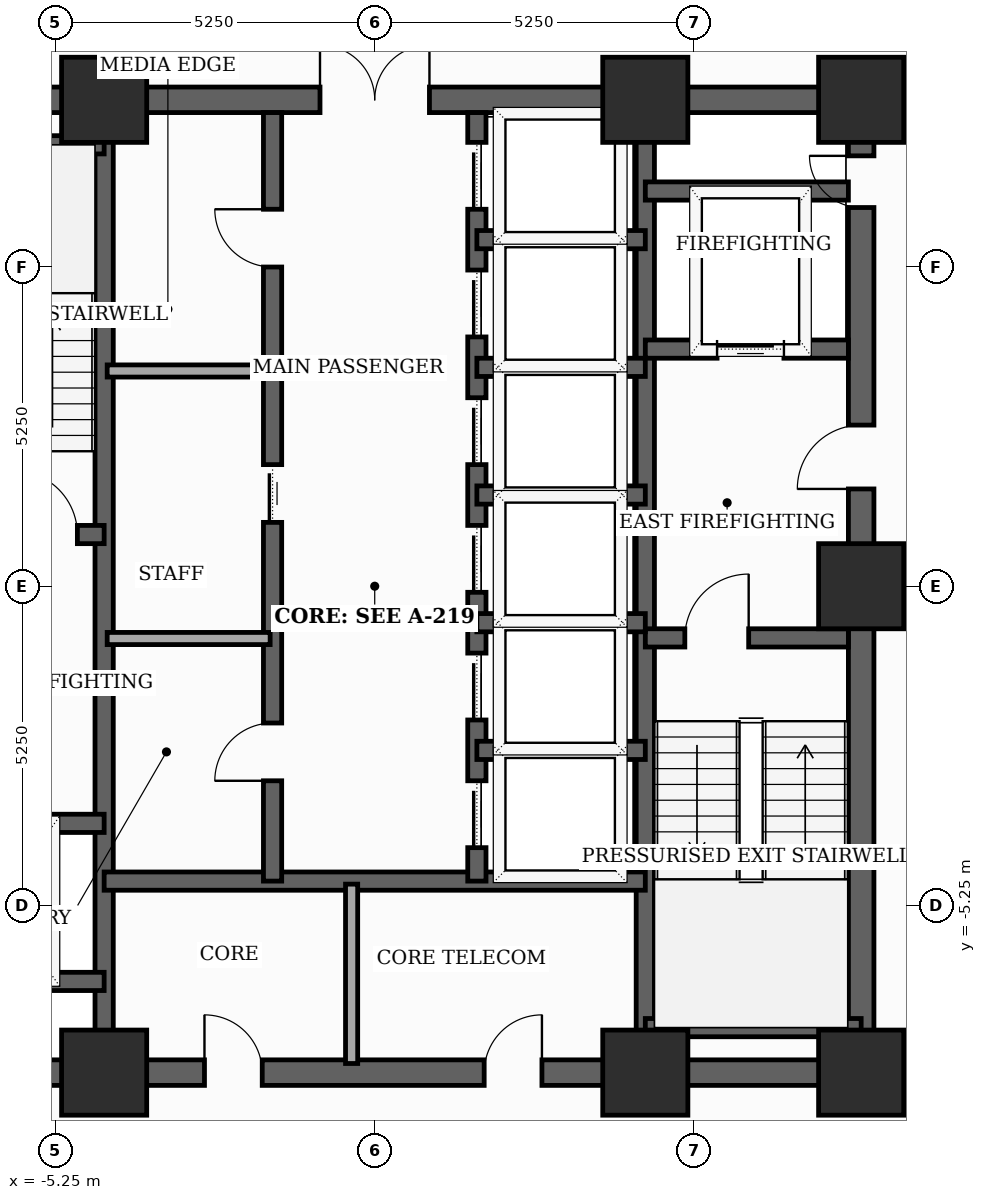
"""IFC4 building model, lengths in metres.
Left out: names, types, materials, properties, quantities, classifications, styles, units other than length and angle.
Written with IfcOpenShell. Run it as: python <this file> out.ifc"""

import sys

from ifc_helpers import new_model, si_unit, direction, frame, frame_2d, origin, origin_2d, place, context, subcontext, project, spatial, rectangle, extrude, element, fill, save


model = new_model("IFC4")
c1 = context("Model", 3, precision=1e-05, world=origin(), true_north=direction((0.0, 1.0)))
c2 = subcontext(c1, "Body", "Model", "MODEL_VIEW")
j1 = project(units=[si_unit("LENGTHUNIT", "METRE"), si_unit("PLANEANGLEUNIT", "RADIAN")], contexts=[c1])
p1 = place(None, origin())
s1 = spatial("IfcSite", under=j1, at=p1, CompositionType="ELEMENT")
p2 = place(p1, origin())
s2 = spatial("IfcBuilding", under=s1, at=p2, CompositionType="ELEMENT")
p3 = place(p2, frame((0.0, 0.0, 162.0)))
s3 = spatial("IfcBuildingStorey", under=s2, at=p3, CompositionType="ELEMENT", Elevation=162.0)
for number, where, z_axis, x_axis in (
    (1, (-4.45, -8.0, 0.0), (0.0, 0.0, 1.0), (1.0, 0.0, 0.0)),
    (2, (4.45, -8.0, 0.0), (0.0, 0.0, 1.0), (1.0, 0.0, 0.0)),
    (3, (8.0, -8.0, 0.0), (0.0, 0.0, 1.0), (1.0, 0.0, 0.0)),
    (4, (8.0, 0.0, 0.0), (0.0, 0.0, 1.0), (1.0, 0.0, 0.0)),
    (5, (8.0, 8.0, 0.0), (0.0, 0.0, 1.0), (1.0, 0.0, 0.0)),
    (6, (4.45, 8.0, 0.0), (0.0, 0.0, 1.0), (1.0, 0.0, 0.0)),
    (7, (-4.45, 8.0, 0.0), (0.0, 0.0, 1.0), (1.0, 0.0, 0.0)),
):
    element("IfcColumn", number, at=place(p3, frame(where, z_axis=z_axis, x_axis=x_axis)), inside=s3, PredefinedType="COLUMN", context=c2, shape_type="SweptSolid", body=[
        extrude(rectangle(XDim=1.4, YDim=1.4, at=origin_2d()), origin(), (0.0, 0.0, 1.0), 3.7),
    ])
p4 = place(p3, frame((8.0, -8.0, 0.0), z_axis=(0.0, 0.0, 1.0), x_axis=(0.0, 1.0, 0.0)))
e8 = element("IfcWall", 8, at=p4, inside=s3, PredefinedType="SHEAR", context=c2, shape_type="SweptSolid", body=[
    extrude(rectangle(XDim=16.0, YDim=0.42, at=frame_2d((8.0, 0.0))), origin(), (0.0, 0.0, 1.0), 3.5),
])
p5 = place(p4, frame((9.6, 0.0, 0.0)))
e9 = element("IfcOpeningElement", 9, at=p5, cuts=e8, PredefinedType="OPENING", context=c2, shape_type="SweptSolid", body=[
    extrude(rectangle(XDim=1.05, YDim=2.15, at=frame_2d((0.525, 1.075))), frame((0.0, 0.22, 0.0), z_axis=(0.0, -1.0, 0.0), x_axis=(1.0, 0.0, 0.0)), (0.0, 0.0, 1.0), 0.44),
])
p6 = place(p4, frame((14.229, 0.0, 0.0)))
e10 = element("IfcOpeningElement", 10, at=p6, cuts=e8, PredefinedType="OPENING", context=c2, shape_type="SweptSolid", body=[
    extrude(rectangle(XDim=0.85, YDim=2.02, at=frame_2d((0.425, 1.01))), frame((0.0, 0.22, 0.0), z_axis=(0.0, -1.0, 0.0), x_axis=(1.0, 0.0, 0.0)), (0.0, 0.0, 1.0), 0.44),
])
p7 = place(p3, frame((-8.0, -8.0, 0.0), z_axis=(0.0, 0.0, 1.0), x_axis=(1.0, 0.0, 0.0)))
e11 = element("IfcWall", 11, at=p7, inside=s3, PredefinedType="SHEAR", context=c2, shape_type="SweptSolid", body=[
    extrude(rectangle(XDim=16.0, YDim=0.42, at=frame_2d((8.0, 0.0))), origin(), (0.0, 0.0, 1.0), 3.5),
])
p8 = place(p7, frame((5.2, 0.0, 0.0)))
e12 = element("IfcOpeningElement", 12, at=p8, cuts=e11, PredefinedType="OPENING", context=c2, shape_type="SweptSolid", body=[
    extrude(rectangle(XDim=0.95, YDim=2.1, at=frame_2d((0.475, 1.05))), frame((0.0, 0.22, 0.0), z_axis=(0.0, -1.0, 0.0), x_axis=(1.0, 0.0, 0.0)), (0.0, 0.0, 1.0), 0.44),
])
p9 = place(p7, frame((9.8, 0.0, 0.0)))
e13 = element("IfcOpeningElement", 13, at=p9, cuts=e11, PredefinedType="OPENING", context=c2, shape_type="SweptSolid", body=[
    extrude(rectangle(XDim=0.95, YDim=2.1, at=frame_2d((0.475, 1.05))), frame((0.0, 0.22, 0.0), z_axis=(0.0, -1.0, 0.0), x_axis=(1.0, 0.0, 0.0)), (0.0, 0.0, 1.0), 0.44),
])
p10 = place(p3, frame((-8.0, 8.0, 0.0), z_axis=(0.0, 0.0, 1.0), x_axis=(1.0, 0.0, 0.0)))
e14 = element("IfcWall", 14, at=p10, inside=s3, PredefinedType="SHEAR", context=c2, shape_type="SweptSolid", body=[
    extrude(rectangle(XDim=16.0, YDim=0.42, at=frame_2d((8.0, 0.0))), origin(), (0.0, 0.0, 1.0), 3.5),
])
p11 = place(p10, frame((7.1, 0.0, 0.0)))
e15 = element("IfcOpeningElement", 15, at=p11, cuts=e14, PredefinedType="OPENING", context=c2, shape_type="SweptSolid", body=[
    extrude(rectangle(XDim=1.8, YDim=2.15, at=frame_2d((0.9, 1.075))), frame((0.0, 0.22, 0.0), z_axis=(0.0, -1.0, 0.0), x_axis=(1.0, 0.0, 0.0)), (0.0, 0.0, 1.0), 0.44),
])
for number, where, z_axis, x_axis in (
    (16, (-4.45, -7.79, 0.0), (0.0, 0.0, 1.0), (0.0, 1.0, 0.0)),
    (17, (4.45, -7.79, 0.0), (0.0, 0.0, 1.0), (0.0, 1.0, 0.0)),
):
    element("IfcWall", number, at=place(p3, frame(where, z_axis=z_axis, x_axis=x_axis)), inside=s3, PredefinedType="SHEAR", context=c2, shape_type="SweptSolid", body=[
        extrude(rectangle(XDim=15.58, YDim=0.3, at=frame_2d((7.79, 0.0))), origin(), (0.0, 0.0, 1.0), 3.5),
    ])
p12 = place(p3, frame((-7.79, 0.85, 0.0), z_axis=(0.0, 0.0, 1.0), x_axis=(1.0, 0.0, 0.0)))
e18 = element("IfcWall", 18, at=p12, inside=s3, PredefinedType="SHEAR", context=c2, shape_type="SweptSolid", body=[
    extrude(rectangle(XDim=3.34, YDim=0.3, at=frame_2d((1.67, 0.0))), origin(), (0.0, 0.0, 1.0), 3.5),
])
p13 = place(p12, frame((1.85, 0.0, 0.0)))
e19 = element("IfcOpeningElement", 19, at=p13, cuts=e18, PredefinedType="OPENING", context=c2, shape_type="SweptSolid", body=[
    extrude(rectangle(XDim=1.05, YDim=2.15, at=frame_2d((0.525, 1.075))), frame((0.0, 0.16, 0.0), z_axis=(0.0, -1.0, 0.0), x_axis=(1.0, 0.0, 0.0)), (0.0, 0.0, 1.0), 0.32),
])
p14 = place(p3, frame((-7.79, 7.26, 0.0), z_axis=(0.0, 0.0, 1.0), x_axis=(1.0, 0.0, 0.0)))
e20 = element("IfcWall", 20, at=p14, inside=s3, PredefinedType="SHEAR", context=c2, shape_type="SweptSolid", body=[
    extrude(rectangle(XDim=3.34, YDim=0.3, at=frame_2d((1.67, 0.0))), origin(), (0.0, 0.0, 1.0), 3.5),
])
p15 = place(p3, frame((4.45, -0.85, 0.0), z_axis=(0.0, 0.0, 1.0), x_axis=(1.0, 0.0, 0.0)))
e21 = element("IfcWall", 21, at=p15, inside=s3, PredefinedType="SHEAR", context=c2, shape_type="SweptSolid", body=[
    extrude(rectangle(XDim=3.34, YDim=0.3, at=frame_2d((1.67, 0.0))), origin(), (0.0, 0.0, 1.0), 3.5),
])
p16 = place(p15, frame((0.65, 0.0, 0.0)))
e22 = element("IfcOpeningElement", 22, at=p16, cuts=e21, PredefinedType="OPENING", context=c2, shape_type="SweptSolid", body=[
    extrude(rectangle(XDim=1.05, YDim=2.15, at=frame_2d((0.525, 1.075))), frame((0.0, 0.16, 0.0), z_axis=(0.0, -1.0, 0.0), x_axis=(1.0, 0.0, 0.0)), (0.0, 0.0, 1.0), 0.32),
])
p17 = place(p3, frame((4.45, -7.26, 0.0), z_axis=(0.0, 0.0, 1.0), x_axis=(1.0, 0.0, 0.0)))
e23 = element("IfcWall", 23, at=p17, inside=s3, PredefinedType="SHEAR", context=c2, shape_type="SweptSolid", body=[
    extrude(rectangle(XDim=3.55, YDim=0.3, at=frame_2d((1.775, 0.0))), origin(), (0.0, 0.0, 1.0), 3.5),
])
p18 = place(p3, frame((-7.79, -3.9, 0.0), z_axis=(0.0, 0.0, 1.0), x_axis=(1.0, 0.0, 0.0)))
e24 = element("IfcWall", 24, at=p18, inside=s3, PredefinedType="SHEAR", context=c2, shape_type="SweptSolid", body=[
    extrude(rectangle(XDim=3.34, YDim=0.3, at=frame_2d((1.67, 0.0))), origin(), (0.0, 0.0, 1.0), 3.5),
])
p19 = place(p18, frame((1.27, 0.0, 0.0)))
e25 = element("IfcOpeningElement", 25, at=p19, cuts=e24, PredefinedType="OPENING", context=c2, shape_type="SweptSolid", body=[
    extrude(rectangle(XDim=1.1, YDim=2.1, at=frame_2d((0.55, 1.05))), frame((0.0, 0.16, 0.0), z_axis=(0.0, -1.0, 0.0), x_axis=(1.0, 0.0, 0.0)), (0.0, 0.0, 1.0), 0.32),
])
p20 = place(p3, frame((-7.79, -6.5, 0.0), z_axis=(0.0, 0.0, 1.0), x_axis=(1.0, 0.0, 0.0)))
e26 = element("IfcWall", 26, at=p20, inside=s3, PredefinedType="SHEAR", context=c2, shape_type="SweptSolid", body=[
    extrude(rectangle(XDim=3.34, YDim=0.3, at=frame_2d((1.67, 0.0))), origin(), (0.0, 0.0, 1.0), 3.5),
])
p21 = place(p3, frame((4.45, 3.9, 0.0), z_axis=(0.0, 0.0, 1.0), x_axis=(1.0, 0.0, 0.0)))
e27 = element("IfcWall", 27, at=p21, inside=s3, PredefinedType="SHEAR", context=c2, shape_type="SweptSolid", body=[
    extrude(rectangle(XDim=3.34, YDim=0.3, at=frame_2d((1.67, 0.0))), origin(), (0.0, 0.0, 1.0), 3.5),
])
p22 = place(p21, frame((1.18, 0.0, 0.0)))
e28 = element("IfcOpeningElement", 28, at=p22, cuts=e27, PredefinedType="OPENING", context=c2, shape_type="SweptSolid", body=[
    extrude(rectangle(XDim=1.1, YDim=2.1, at=frame_2d((0.55, 1.05))), frame((0.0, 0.16, 0.0), z_axis=(0.0, -1.0, 0.0), x_axis=(1.0, 0.0, 0.0)), (0.0, 0.0, 1.0), 0.32),
])
p23 = place(p3, frame((4.45, 6.5, 0.0), z_axis=(0.0, 0.0, 1.0), x_axis=(1.0, 0.0, 0.0)))
e29 = element("IfcWall", 29, at=p23, inside=s3, PredefinedType="SHEAR", context=c2, shape_type="SweptSolid", body=[
    extrude(rectangle(XDim=3.34, YDim=0.3, at=frame_2d((1.67, 0.0))), origin(), (0.0, 0.0, 1.0), 3.5),
])
p24 = place(p3, frame((-4.45, -4.85, 0.0), z_axis=(0.0, 0.0, 1.0), x_axis=(1.0, 0.0, 0.0)))
e30 = element("IfcWall", 30, at=p24, inside=s3, PredefinedType="SHEAR", context=c2, shape_type="SweptSolid", body=[
    extrude(rectangle(XDim=8.9, YDim=0.3, at=frame_2d((4.45, 0.0))), origin(), (0.0, 0.0, 1.0), 3.5),
])
p25 = place(p3, frame((-1.68, -4.85, 0.0), z_axis=(0.0, 0.0, 1.0), x_axis=(0.0, 1.0, 0.0)))
e31 = element("IfcWall", 31, at=p25, inside=s3, PredefinedType="SHEAR", context=c2, shape_type="SweptSolid", body=[
    extrude(rectangle(XDim=12.64, YDim=0.3, at=frame_2d((6.32, 0.0))), origin(), (0.0, 0.0, 1.0), 3.5),
])
p26 = place(p25, frame((1.65, 0.0, 0.0)))
e32 = element("IfcOpeningElement", 32, at=p26, cuts=e31, PredefinedType="OPENING", context=c2, shape_type="SweptSolid", body=[
    extrude(rectangle(XDim=0.95, YDim=2.1, at=frame_2d((0.475, 1.05))), frame((0.0, 0.16, 0.0), z_axis=(0.0, -1.0, 0.0), x_axis=(1.0, 0.0, 0.0)), (0.0, 0.0, 1.0), 0.32),
])
p27 = place(p25, frame((5.9, 0.0, 0.0)))
e33 = element("IfcOpeningElement", 33, at=p27, cuts=e31, PredefinedType="OPENING", context=c2, shape_type="SweptSolid", body=[
    extrude(rectangle(XDim=0.95, YDim=2.1, at=frame_2d((0.475, 1.05))), frame((0.0, 0.16, 0.0), z_axis=(0.0, -1.0, 0.0), x_axis=(1.0, 0.0, 0.0)), (0.0, 0.0, 1.0), 0.32),
])
p28 = place(p25, frame((10.1, 0.0, 0.0)))
e34 = element("IfcOpeningElement", 34, at=p28, cuts=e31, PredefinedType="OPENING", context=c2, shape_type="SweptSolid", body=[
    extrude(rectangle(XDim=0.95, YDim=2.1, at=frame_2d((0.475, 1.05))), frame((0.0, 0.16, 0.0), z_axis=(0.0, -1.0, 0.0), x_axis=(1.0, 0.0, 0.0)), (0.0, 0.0, 1.0), 0.32),
])
p29 = place(p3, frame((1.68, -4.85, 0.0), z_axis=(0.0, 0.0, 1.0), x_axis=(0.0, 1.0, 0.0)))
e35 = element("IfcWall", 35, at=p29, inside=s3, PredefinedType="SHEAR", context=c2, shape_type="SweptSolid", body=[
    extrude(rectangle(XDim=12.64, YDim=0.3, at=frame_2d((6.32, 0.0))), origin(), (0.0, 0.0, 1.0), 3.5),
])
p30 = place(p29, frame((0.55, 0.0, 0.0)))
e36 = element("IfcOpeningElement", 36, at=p30, cuts=e35, PredefinedType="OPENING", context=c2, shape_type="SweptSolid", body=[
    extrude(rectangle(XDim=1.1, YDim=2.1, at=frame_2d((0.55, 1.05))), frame((0.0, 0.16, 0.0), z_axis=(0.0, -1.0, 0.0), x_axis=(1.0, 0.0, 0.0)), (0.0, 0.0, 1.0), 0.32),
])
p31 = place(p29, frame((2.65, 0.0, 0.0)))
e37 = element("IfcOpeningElement", 37, at=p31, cuts=e35, PredefinedType="OPENING", context=c2, shape_type="SweptSolid", body=[
    extrude(rectangle(XDim=1.1, YDim=2.1, at=frame_2d((0.55, 1.05))), frame((0.0, 0.16, 0.0), z_axis=(0.0, -1.0, 0.0), x_axis=(1.0, 0.0, 0.0)), (0.0, 0.0, 1.0), 0.32),
])
p32 = place(p29, frame((4.75, 0.0, 0.0)))
e38 = element("IfcOpeningElement", 38, at=p32, cuts=e35, PredefinedType="OPENING", context=c2, shape_type="SweptSolid", body=[
    extrude(rectangle(XDim=1.1, YDim=2.1, at=frame_2d((0.55, 1.05))), frame((0.0, 0.16, 0.0), z_axis=(0.0, -1.0, 0.0), x_axis=(1.0, 0.0, 0.0)), (0.0, 0.0, 1.0), 0.32),
])
p33 = place(p29, frame((6.85, 0.0, 0.0)))
e39 = element("IfcOpeningElement", 39, at=p33, cuts=e35, PredefinedType="OPENING", context=c2, shape_type="SweptSolid", body=[
    extrude(rectangle(XDim=1.1, YDim=2.1, at=frame_2d((0.55, 1.05))), frame((0.0, 0.16, 0.0), z_axis=(0.0, -1.0, 0.0), x_axis=(1.0, 0.0, 0.0)), (0.0, 0.0, 1.0), 0.32),
])
p34 = place(p29, frame((8.95, 0.0, 0.0)))
e40 = element("IfcOpeningElement", 40, at=p34, cuts=e35, PredefinedType="OPENING", context=c2, shape_type="SweptSolid", body=[
    extrude(rectangle(XDim=1.1, YDim=2.1, at=frame_2d((0.55, 1.05))), frame((0.0, 0.16, 0.0), z_axis=(0.0, -1.0, 0.0), x_axis=(1.0, 0.0, 0.0)), (0.0, 0.0, 1.0), 0.32),
])
p35 = place(p29, frame((11.05, 0.0, 0.0)))
e41 = element("IfcOpeningElement", 41, at=p35, cuts=e35, PredefinedType="OPENING", context=c2, shape_type="SweptSolid", body=[
    extrude(rectangle(XDim=1.1, YDim=2.1, at=frame_2d((0.55, 1.05))), frame((0.0, 0.16, 0.0), z_axis=(0.0, -1.0, 0.0), x_axis=(1.0, 0.0, 0.0)), (0.0, 0.0, 1.0), 0.32),
])
for number, where, z_axis, x_axis in (
    (42, (1.68, 1.5, 0.0), (0.0, 0.0, 1.0), (1.0, 0.0, 0.0)),
    (43, (1.68, 3.6, 0.0), (0.0, 0.0, 1.0), (1.0, 0.0, 0.0)),
    (44, (1.68, 5.7, 0.0), (0.0, 0.0, 1.0), (1.0, 0.0, 0.0)),
    (45, (1.68, -2.7, 0.0), (0.0, 0.0, 1.0), (1.0, 0.0, 0.0)),
    (46, (1.68, -0.6, 0.0), (0.0, 0.0, 1.0), (1.0, 0.0, 0.0)),
):
    element("IfcWall", number, at=place(p3, frame(where, z_axis=z_axis, x_axis=x_axis)), inside=s3, PredefinedType="SHEAR", context=c2, shape_type="SweptSolid", body=[
        extrude(rectangle(XDim=2.77, YDim=0.3, at=frame_2d((1.385, 0.0))), origin(), (0.0, 0.0, 1.0), 3.5),
    ])
p36 = place(p3, frame((-0.38, -7.85, 0.0), z_axis=(0.0, 0.0, 1.0), x_axis=(0.0, 1.0, 0.0)))
e47 = element("IfcWall", 47, at=p36, inside=s3, PredefinedType="SOLIDWALL", context=c2, shape_type="SweptSolid", body=[
    extrude(rectangle(XDim=2.95, YDim=0.2, at=frame_2d((1.475, 0.0))), origin(), (0.0, 0.0, 1.0), 2.885),
])
for number, where, z_axis, x_axis in (
    (48, (-4.4, -0.86, 0.0), (0.0, 0.0, 1.0), (1.0, 0.0, 0.0)),
    (49, (-4.4, 3.54, 0.0), (0.0, 0.0, 1.0), (1.0, 0.0, 0.0)),
):
    element("IfcWall", number, at=place(p3, frame(where, z_axis=z_axis, x_axis=x_axis)), inside=s3, PredefinedType="SOLIDWALL", context=c2, shape_type="SweptSolid", body=[
        extrude(rectangle(XDim=2.68, YDim=0.2, at=frame_2d((1.34, 0.0))), origin(), (0.0, 0.0, 1.0), 3.5),
    ])
p37 = place(p5, origin())
e50 = element("IfcDoor", 50, at=p37, inside=s3, OperationType="SINGLE_SWING_LEFT", PredefinedType="DOOR", context=c2, shape_type="SweptSolid", body=[
    extrude(rectangle(XDim=1.05, YDim=2.15, at=frame_2d((0.525, 1.075))), frame((0.0, 0.025, 0.0), z_axis=(0.0, -1.0, 0.0), x_axis=(1.0, 0.0, 0.0)), (0.0, 0.0, 1.0), 0.05),
])
fill(e9, e50)
p38 = place(p6, origin())
e51 = element("IfcDoor", 51, at=p38, inside=s3, OperationType="SINGLE_SWING_RIGHT", PredefinedType="TRAPDOOR", context=c2, shape_type="SweptSolid", body=[
    extrude(rectangle(XDim=0.85, YDim=2.02, at=frame_2d((0.425, 1.01))), frame((0.0, 0.025, 0.0), z_axis=(0.0, -1.0, 0.0), x_axis=(1.0, 0.0, 0.0)), (0.0, 0.0, 1.0), 0.05),
])
fill(e10, e51)
p39 = place(p8, origin())
e52 = element("IfcDoor", 52, at=p39, inside=s3, OperationType="SINGLE_SWING_LEFT", PredefinedType="DOOR", context=c2, shape_type="SweptSolid", body=[
    extrude(rectangle(XDim=0.95, YDim=2.1, at=frame_2d((0.475, 1.05))), frame((0.0, 0.025, 0.0), z_axis=(0.0, -1.0, 0.0), x_axis=(1.0, 0.0, 0.0)), (0.0, 0.0, 1.0), 0.05),
])
fill(e12, e52)
p40 = place(p9, origin())
e53 = element("IfcDoor", 53, at=p40, inside=s3, OperationType="SINGLE_SWING_RIGHT", PredefinedType="DOOR", context=c2, shape_type="SweptSolid", body=[
    extrude(rectangle(XDim=0.95, YDim=2.1, at=frame_2d((0.475, 1.05))), frame((0.0, 0.025, 0.0), z_axis=(0.0, -1.0, 0.0), x_axis=(1.0, 0.0, 0.0)), (0.0, 0.0, 1.0), 0.05),
])
fill(e13, e53)
p41 = place(p11, origin())
e54 = element("IfcDoor", 54, at=p41, inside=s3, OperationType="DOUBLE_DOOR_SINGLE_SWING", PredefinedType="DOOR", context=c2, shape_type="SweptSolid", body=[
    extrude(rectangle(XDim=1.8, YDim=2.15, at=frame_2d((0.9, 1.075))), frame((0.0, 0.025, 0.0), z_axis=(0.0, -1.0, 0.0), x_axis=(1.0, 0.0, 0.0)), (0.0, 0.0, 1.0), 0.05),
])
fill(e15, e54)
p42 = place(p13, origin())
e55 = element("IfcDoor", 55, at=p42, inside=s3, OperationType="SINGLE_SWING_LEFT", PredefinedType="DOOR", context=c2, shape_type="SweptSolid", body=[
    extrude(rectangle(XDim=1.05, YDim=2.15, at=frame_2d((0.525, 1.075))), frame((0.0, 0.025, 0.0), z_axis=(0.0, -1.0, 0.0), x_axis=(1.0, 0.0, 0.0)), (0.0, 0.0, 1.0), 0.05),
])
fill(e19, e55)
p43 = place(p16, origin())
e56 = element("IfcDoor", 56, at=p43, inside=s3, OperationType="SINGLE_SWING_RIGHT", PredefinedType="DOOR", context=c2, shape_type="SweptSolid", body=[
    extrude(rectangle(XDim=1.05, YDim=2.15, at=frame_2d((0.525, 1.075))), frame((0.0, 0.025, 0.0), z_axis=(0.0, -1.0, 0.0), x_axis=(1.0, 0.0, 0.0)), (0.0, 0.0, 1.0), 0.05),
])
fill(e22, e56)
p44 = place(p22, origin())
e57 = element("IfcDoor", 57, at=p44, inside=s3, OperationType="SLIDING_TO_LEFT", PredefinedType="DOOR", context=c2, shape_type="SweptSolid", body=[
    extrude(rectangle(XDim=1.1, YDim=2.1, at=frame_2d((0.55, 1.05))), frame((0.0, 0.025, 0.0), z_axis=(0.0, -1.0, 0.0), x_axis=(1.0, 0.0, 0.0)), (0.0, 0.0, 1.0), 0.05),
])
fill(e28, e57)
p45 = place(p26, origin())
e58 = element("IfcDoor", 58, at=p45, inside=s3, OperationType="SINGLE_SWING_LEFT", PredefinedType="DOOR", context=c2, shape_type="SweptSolid", body=[
    extrude(rectangle(XDim=0.95, YDim=2.1, at=frame_2d((0.475, 1.05))), frame((0.0, 0.025, 0.0), z_axis=(0.0, -1.0, 0.0), x_axis=(1.0, 0.0, 0.0)), (0.0, 0.0, 1.0), 0.05),
])
fill(e32, e58)
p46 = place(p27, origin())
e59 = element("IfcDoor", 59, at=p46, inside=s3, OperationType="SLIDING_TO_LEFT", PredefinedType="DOOR", context=c2, shape_type="SweptSolid", body=[
    extrude(rectangle(XDim=0.95, YDim=2.1, at=frame_2d((0.475, 1.05))), frame((0.0, 0.025, 0.0), z_axis=(0.0, -1.0, 0.0), x_axis=(1.0, 0.0, 0.0)), (0.0, 0.0, 1.0), 0.05),
])
fill(e33, e59)
p47 = place(p28, origin())
e60 = element("IfcDoor", 60, at=p47, inside=s3, OperationType="SINGLE_SWING_RIGHT", PredefinedType="DOOR", context=c2, shape_type="SweptSolid", body=[
    extrude(rectangle(XDim=0.95, YDim=2.1, at=frame_2d((0.475, 1.05))), frame((0.0, 0.025, 0.0), z_axis=(0.0, -1.0, 0.0), x_axis=(1.0, 0.0, 0.0)), (0.0, 0.0, 1.0), 0.05),
])
fill(e34, e60)
p48 = place(p30, origin())
e61 = element("IfcDoor", 61, at=p48, inside=s3, OperationType="SLIDING_TO_LEFT", PredefinedType="DOOR", context=c2, shape_type="SweptSolid", body=[
    extrude(rectangle(XDim=1.1, YDim=2.1, at=frame_2d((0.55, 1.05))), frame((0.0, 0.025, 0.0), z_axis=(0.0, -1.0, 0.0), x_axis=(1.0, 0.0, 0.0)), (0.0, 0.0, 1.0), 0.05),
])
fill(e36, e61)
p49 = place(p31, origin())
e62 = element("IfcDoor", 62, at=p49, inside=s3, OperationType="SLIDING_TO_LEFT", PredefinedType="DOOR", context=c2, shape_type="SweptSolid", body=[
    extrude(rectangle(XDim=1.1, YDim=2.1, at=frame_2d((0.55, 1.05))), frame((0.0, 0.025, 0.0), z_axis=(0.0, -1.0, 0.0), x_axis=(1.0, 0.0, 0.0)), (0.0, 0.0, 1.0), 0.05),
])
fill(e37, e62)
p50 = place(p32, origin())
e63 = element("IfcDoor", 63, at=p50, inside=s3, OperationType="SLIDING_TO_LEFT", PredefinedType="DOOR", context=c2, shape_type="SweptSolid", body=[
    extrude(rectangle(XDim=1.1, YDim=2.1, at=frame_2d((0.55, 1.05))), frame((0.0, 0.025, 0.0), z_axis=(0.0, -1.0, 0.0), x_axis=(1.0, 0.0, 0.0)), (0.0, 0.0, 1.0), 0.05),
])
fill(e38, e63)
p51 = place(p33, origin())
e64 = element("IfcDoor", 64, at=p51, inside=s3, OperationType="SLIDING_TO_LEFT", PredefinedType="DOOR", context=c2, shape_type="SweptSolid", body=[
    extrude(rectangle(XDim=1.1, YDim=2.1, at=frame_2d((0.55, 1.05))), frame((0.0, 0.025, 0.0), z_axis=(0.0, -1.0, 0.0), x_axis=(1.0, 0.0, 0.0)), (0.0, 0.0, 1.0), 0.05),
])
fill(e39, e64)
p52 = place(p34, origin())
e65 = element("IfcDoor", 65, at=p52, inside=s3, OperationType="SLIDING_TO_LEFT", PredefinedType="DOOR", context=c2, shape_type="SweptSolid", body=[
    extrude(rectangle(XDim=1.1, YDim=2.1, at=frame_2d((0.55, 1.05))), frame((0.0, 0.025, 0.0), z_axis=(0.0, -1.0, 0.0), x_axis=(1.0, 0.0, 0.0)), (0.0, 0.0, 1.0), 0.05),
])
fill(e40, e65)
p53 = place(p35, origin())
e66 = element("IfcDoor", 66, at=p53, inside=s3, OperationType="SLIDING_TO_LEFT", PredefinedType="DOOR", context=c2, shape_type="SweptSolid", body=[
    extrude(rectangle(XDim=1.1, YDim=2.1, at=frame_2d((0.55, 1.05))), frame((0.0, 0.025, 0.0), z_axis=(0.0, -1.0, 0.0), x_axis=(1.0, 0.0, 0.0)), (0.0, 0.0, 1.0), 0.05),
])
fill(e41, e66)
save(model, sys.argv[1])
